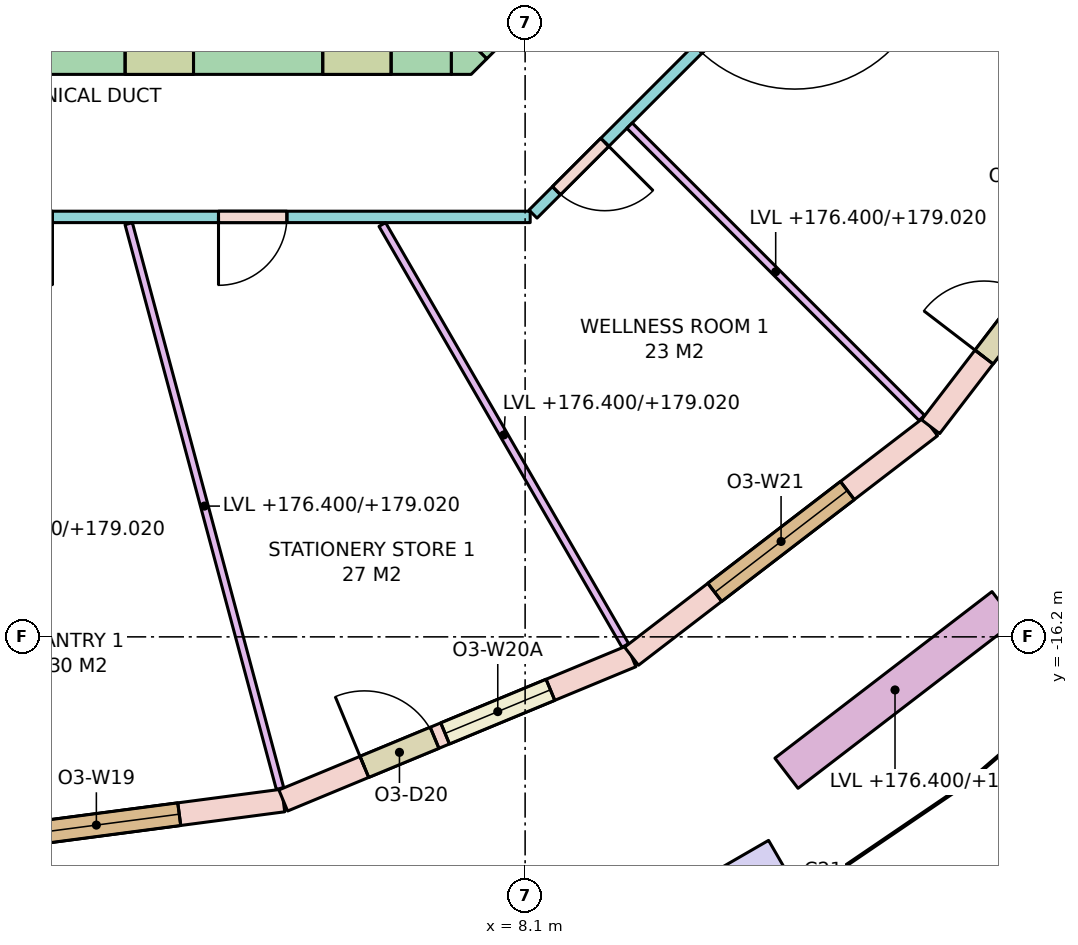
"""IFC4 building model, lengths in metres.
Left out: names, types, materials, properties, quantities, classifications, styles, units other than length and angle.
Written with IfcOpenShell. Run it as: python <this file> out.ifc"""

import sys

from ifc_helpers import new_model, si_unit, direction, frame, frame_2d, origin, origin_2d, place, context, subcontext, project, spatial, polyline, rectangle, outline, extrude, element, fill, save


model = new_model("IFC4")
c1 = context("Model", 3, precision=1e-05, world=origin(), true_north=direction((0.0, 1.0)))
c2 = subcontext(c1, "Body", "Model", "MODEL_VIEW")
j1 = project(units=[si_unit("LENGTHUNIT", "METRE"), si_unit("PLANEANGLEUNIT", "RADIAN")], contexts=[c1])
p1 = place(None, origin())
s1 = spatial("IfcSite", under=j1, at=p1, CompositionType="ELEMENT")
p2 = place(p1, origin())
s2 = spatial("IfcBuilding", under=s1, at=p2, CompositionType="ELEMENT")
p3 = place(p2, frame((0.0, 0.0, 176.4)))
s3 = spatial("IfcBuildingStorey", under=s2, at=p3, CompositionType="ELEMENT", Elevation=176.4)
p4 = place(p3, frame((11.25, -19.486, 0.0), z_axis=(0.0, 0.0, 1.0), x_axis=(0.866025403784, 0.5, 0.0)))
e1 = element("IfcColumn", 1, at=p4, inside=s3, PredefinedType="COLUMN", context=c2, shape_type="SweptSolid", body=[
    extrude(rectangle(XDim=0.7, YDim=1.0, at=origin_2d()), origin(), (0.0, 0.0, 1.0), 3.7),
])
p5 = place(p3, frame((-7.13, -8.45, -0.28), z_axis=(0.0, 0.0, 1.0), x_axis=(1.0, 0.0, 0.0)))
e2 = element("IfcWall", 2, at=p5, inside=s3, PredefinedType="SHEAR", context=c2, shape_type="SweptSolid", body=[
    extrude(rectangle(XDim=14.26, YDim=0.7, at=frame_2d((7.13, 0.0))), origin(), (0.0, 0.0, 1.0), 3.7),
])
p6 = place(p5, frame((8.08, 0.0, 0.28)))
e3 = element("IfcOpeningElement", 3, at=p6, cuts=e2, PredefinedType="OPENING", context=c2, shape_type="SweptSolid", body=[
    extrude(rectangle(XDim=0.7, YDim=2.1, at=frame_2d((0.35, 1.05))), frame((0.0, 0.36, 0.0), z_axis=(0.0, -1.0, 0.0), x_axis=(1.0, 0.0, 0.0)), (0.0, 0.0, 1.0), 0.72),
])
p7 = place(p5, frame((6.205, 0.0, 0.28)))
e4 = element("IfcOpeningElement", 4, at=p7, cuts=e2, PredefinedType="OPENING", context=c2, shape_type="SweptSolid", body=[
    extrude(rectangle(XDim=0.9, YDim=2.1, at=frame_2d((0.45, 1.05))), frame((0.0, 0.36, 0.0), z_axis=(0.0, -1.0, 0.0), x_axis=(1.0, 0.0, 0.0)), (0.0, 0.0, 1.0), 0.72),
])
p8 = place(p5, frame((9.967, 0.0, 0.28)))
e5 = element("IfcOpeningElement", 5, at=p8, cuts=e2, PredefinedType="OPENING", context=c2, shape_type="SweptSolid", body=[
    extrude(rectangle(XDim=0.9, YDim=2.1, at=frame_2d((0.45, 1.05))), frame((0.0, 0.36, 0.0), z_axis=(0.0, -1.0, 0.0), x_axis=(1.0, 0.0, 0.0)), (0.0, 0.0, 1.0), 0.72),
])
p9 = place(p5, frame((12.567, 0.0, 0.28)))
e6 = element("IfcOpeningElement", 6, at=p9, cuts=e2, PredefinedType="OPENING", context=c2, shape_type="SweptSolid", body=[
    extrude(rectangle(XDim=0.9, YDim=2.1, at=frame_2d((0.45, 1.05))), frame((0.0, 0.36, 0.0), z_axis=(0.0, -1.0, 0.0), x_axis=(1.0, 0.0, 0.0)), (0.0, 0.0, 1.0), 0.72),
])
p10 = place(p3, frame((10.347, -5.347, -0.28), z_axis=(0.0, 0.0, 1.0), x_axis=(-0.707106781187, -0.707106781187, 0.0)))
e7 = element("IfcWall", 7, at=p10, inside=s3, PredefinedType="SHEAR", context=c2, shape_type="SweptSolid", body=[
    extrude(rectangle(XDim=4.243, YDim=0.7, at=frame_2d((2.121, 0.0))), origin(), (0.0, 0.0, 1.0), 3.7),
])
p11 = place(p10, frame((0.52, 0.0, 0.28)))
e8 = element("IfcOpeningElement", 8, at=p11, cuts=e7, PredefinedType="OPENING", context=c2, shape_type="SweptSolid", body=[
    extrude(rectangle(XDim=0.9, YDim=2.1, at=frame_2d((0.45, 1.05))), frame((0.0, 0.36, 0.0), z_axis=(0.0, -1.0, 0.0), x_axis=(1.0, 0.0, 0.0)), (0.0, 0.0, 1.0), 0.72),
])
p12 = place(p3, frame((0.0, 0.0, -0.28)))
e9 = element("IfcWall", 9, at=p12, inside=s3, PredefinedType="SHEAR", context=c2, shape_type="SweptSolid", body=[
    extrude(outline(polyline([(7.39, -8.8), (7.13, -8.8), (7.13, -8.8), (7.13, -8.13), (7.595, -8.595), (7.595, -8.595), (7.595, -8.595), (7.39, -8.8)])), origin(), (0.0, 0.0, 1.0), 3.7),
])
p13 = place(p3, frame((0.0, -19.0, 0.0), z_axis=(0.0, 0.0, 1.0), x_axis=(0.991443234469, 0.130538549191, 0.0)))
e10 = element("IfcWall", 10, at=p13, inside=s3, PredefinedType="STANDARD", context=c2, shape_type="SweptSolid", body=[
    extrude(rectangle(XDim=4.96, YDim=0.3, at=frame_2d((2.48, 0.0))), origin(), (0.0, 0.0, 1.0), 3.42),
])
p14 = place(p13, frame((1.38, 0.0, 0.8)))
e11 = element("IfcOpeningElement", 11, at=p14, cuts=e10, PredefinedType="OPENING", context=c2, shape_type="SweptSolid", body=[
    extrude(rectangle(XDim=2.2, YDim=2.4, at=frame_2d((1.1, 1.2))), frame((0.0, 0.16, 0.0), z_axis=(0.0, -1.0, 0.0), x_axis=(1.0, 0.0, 0.0)), (0.0, 0.0, 1.0), 0.32),
])
p15 = place(p3, frame((4.917, -18.353, 0.0), z_axis=(0.0, 0.0, 1.0), x_axis=(0.923893254961, 0.382650301762, 0.0)))
e12 = element("IfcWall", 12, at=p15, inside=s3, PredefinedType="STANDARD", context=c2, shape_type="SweptSolid", body=[
    extrude(rectangle(XDim=4.96, YDim=0.3, at=frame_2d((2.48, 0.0))), origin(), (0.0, 0.0, 1.0), 3.42),
])
p16 = place(p15, frame((1.155, 0.0, 0.0)))
e13 = element("IfcOpeningElement", 13, at=p16, cuts=e12, PredefinedType="OPENING", context=c2, shape_type="SweptSolid", body=[
    extrude(rectangle(XDim=1.0, YDim=2.4, at=frame_2d((0.5, 1.2))), frame((0.0, 0.16, 0.0), z_axis=(0.0, -1.0, 0.0), x_axis=(1.0, 0.0, 0.0)), (0.0, 0.0, 1.0), 0.32),
])
p17 = place(p15, frame((2.305, 0.0, 0.8)))
e14 = element("IfcOpeningElement", 14, at=p17, cuts=e12, PredefinedType="OPENING", context=c2, shape_type="SweptSolid", body=[
    extrude(rectangle(XDim=1.5, YDim=2.4, at=frame_2d((0.75, 1.2))), frame((0.0, 0.16, 0.0), z_axis=(0.0, -1.0, 0.0), x_axis=(1.0, 0.0, 0.0)), (0.0, 0.0, 1.0), 0.32),
])
p18 = place(p3, frame((9.5, -16.455, 0.0), z_axis=(0.0, 0.0, 1.0), x_axis=(0.793348024649, 0.608768356425, 0.0)))
e15 = element("IfcWall", 15, at=p18, inside=s3, PredefinedType="STANDARD", context=c2, shape_type="SweptSolid", body=[
    extrude(rectangle(XDim=4.96, YDim=0.3, at=frame_2d((2.48, 0.0))), origin(), (0.0, 0.0, 1.0), 3.42),
])
p19 = place(p18, frame((1.38, 0.0, 0.8)))
e16 = element("IfcOpeningElement", 16, at=p19, cuts=e15, PredefinedType="OPENING", context=c2, shape_type="SweptSolid", body=[
    extrude(rectangle(XDim=2.2, YDim=2.4, at=frame_2d((1.1, 1.2))), frame((0.0, 0.16, 0.0), z_axis=(0.0, -1.0, 0.0), x_axis=(1.0, 0.0, 0.0)), (0.0, 0.0, 1.0), 0.32),
])
p20 = place(p3, frame((13.435, -13.435, 0.0), z_axis=(0.0, 0.0, 1.0), x_axis=(0.608768356425, 0.793348024649, 0.0)))
e17 = element("IfcWall", 17, at=p20, inside=s3, PredefinedType="STANDARD", context=c2, shape_type="SweptSolid", body=[
    extrude(rectangle(XDim=4.96, YDim=0.3, at=frame_2d((2.48, 0.0))), origin(), (0.0, 0.0, 1.0), 3.42),
])
p21 = place(p20, frame((1.155, 0.0, 0.0)))
e18 = element("IfcOpeningElement", 18, at=p21, cuts=e17, PredefinedType="OPENING", context=c2, shape_type="SweptSolid", body=[
    extrude(rectangle(XDim=1.0, YDim=2.4, at=frame_2d((0.5, 1.2))), frame((0.0, 0.16, 0.0), z_axis=(0.0, -1.0, 0.0), x_axis=(1.0, 0.0, 0.0)), (0.0, 0.0, 1.0), 0.32),
])
p22 = place(p20, frame((2.305, 0.0, 0.8)))
e19 = element("IfcOpeningElement", 19, at=p22, cuts=e17, PredefinedType="OPENING", context=c2, shape_type="SweptSolid", body=[
    extrude(rectangle(XDim=1.5, YDim=2.4, at=frame_2d((0.75, 1.2))), frame((0.0, 0.16, 0.0), z_axis=(0.0, -1.0, 0.0), x_axis=(1.0, 0.0, 0.0)), (0.0, 0.0, 1.0), 0.32),
])
p23 = place(p3, frame((11.539, -17.994, 0.0), z_axis=(0.0, 0.0, 1.0), x_axis=(0.793384730612, 0.608720518162, 0.0)))
e20 = element("IfcWall", 20, at=p23, inside=s3, PredefinedType="PARAPET", context=c2, shape_type="SweptSolid", body=[
    extrude(rectangle(XDim=3.6, YDim=0.5, at=frame_2d((1.8, 0.0))), origin(), (0.0, 0.0, 1.0), 0.9),
])
p24 = place(p3, frame((12.638, -6.204, 0.0), z_axis=(0.0, 0.0, 1.0), x_axis=(-0.707106781187, -0.707106781187, 0.0)))
e21 = element("IfcWall", 21, at=p24, inside=s3, PredefinedType="PARTITIONING", context=c2, shape_type="SweptSolid", body=[
    extrude(rectangle(XDim=6.271, YDim=0.15, at=frame_2d((3.135, 0.0))), origin(), (0.0, 0.0, 1.0), 2.62),
])
p25 = place(p24, frame((4.935, 0.0, 0.0)))
e22 = element("IfcOpeningElement", 22, at=p25, cuts=e21, PredefinedType="OPENING", context=c2, shape_type="SweptSolid", body=[
    extrude(rectangle(XDim=0.9, YDim=2.1, at=frame_2d((0.45, 1.05))), frame((0.0, 0.085, 0.0), z_axis=(0.0, -1.0, 0.0), x_axis=(1.0, 0.0, 0.0)), (0.0, 0.0, 1.0), 0.17),
])
p26 = place(p24, frame((1.4, 0.0, 0.0)))
e23 = element("IfcOpeningElement", 23, at=p26, cuts=e21, PredefinedType="OPENING", context=c2, shape_type="SweptSolid", body=[
    extrude(rectangle(XDim=1.8, YDim=2.1, at=frame_2d((0.9, 1.05))), frame((0.0, 0.085, 0.0), z_axis=(0.0, -1.0, 0.0), x_axis=(1.0, 0.0, 0.0)), (0.0, 0.0, 1.0), 0.17),
])
p27 = place(p3, frame((8.167, -10.675, 0.0), z_axis=(0.0, 0.0, 1.0), x_axis=(-1.0, 0.0, 0.0)))
e24 = element("IfcWall", 24, at=p27, inside=s3, PredefinedType="PARTITIONING", context=c2, shape_type="SweptSolid", body=[
    extrude(rectangle(XDim=16.333, YDim=0.15, at=frame_2d((8.167, 0.0))), origin(), (0.0, 0.0, 1.0), 2.62),
])
p28 = place(p27, frame((13.155, 0.0, 0.0)))
e25 = element("IfcOpeningElement", 25, at=p28, cuts=e24, PredefinedType="OPENING", context=c2, shape_type="SweptSolid", body=[
    extrude(rectangle(XDim=1.0, YDim=2.1, at=frame_2d((0.5, 1.05))), frame((0.0, 0.085, 0.0), z_axis=(0.0, -1.0, 0.0), x_axis=(1.0, 0.0, 0.0)), (0.0, 0.0, 1.0), 0.17),
])
p29 = place(p27, frame((9.148, 0.0, 0.0)))
e26 = element("IfcOpeningElement", 26, at=p29, cuts=e24, PredefinedType="OPENING", context=c2, shape_type="SweptSolid", body=[
    extrude(rectangle(XDim=0.9, YDim=2.1, at=frame_2d((0.45, 1.05))), frame((0.0, 0.085, 0.0), z_axis=(0.0, -1.0, 0.0), x_axis=(1.0, 0.0, 0.0)), (0.0, 0.0, 1.0), 0.17),
])
p30 = place(p27, frame((6.285, 0.0, 0.0)))
e27 = element("IfcOpeningElement", 27, at=p30, cuts=e24, PredefinedType="OPENING", context=c2, shape_type="SweptSolid", body=[
    extrude(rectangle(XDim=0.9, YDim=2.1, at=frame_2d((0.45, 1.05))), frame((0.0, 0.085, 0.0), z_axis=(0.0, -1.0, 0.0), x_axis=(1.0, 0.0, 0.0)), (0.0, 0.0, 1.0), 0.17),
])
p31 = place(p27, frame((3.201, 0.0, 0.0)))
e28 = element("IfcOpeningElement", 28, at=p31, cuts=e24, PredefinedType="OPENING", context=c2, shape_type="SweptSolid", body=[
    extrude(rectangle(XDim=0.9, YDim=2.1, at=frame_2d((0.45, 1.05))), frame((0.0, 0.085, 0.0), z_axis=(0.0, -1.0, 0.0), x_axis=(1.0, 0.0, 0.0)), (0.0, 0.0, 1.0), 0.17),
])
p32 = place(p3, frame((2.884, -10.764, 0.0), z_axis=(0.0, 0.0, 1.0), x_axis=(0.25881804804, -0.965926093451, 0.0)))
e29 = element("IfcWall", 29, at=p32, inside=s3, PredefinedType="PARTITIONING", context=c2, shape_type="SweptSolid", body=[
    extrude(rectangle(XDim=7.693, YDim=0.1, at=frame_2d((3.846, 0.0))), origin(), (0.0, 0.0, 1.0), 2.62),
])
p33 = place(p3, frame((6.221, -10.775, 0.0), z_axis=(0.0, 0.0, 1.0), x_axis=(0.500023166934, -0.866012027936, 0.0)))
e30 = element("IfcWall", 30, at=p33, inside=s3, PredefinedType="PARTITIONING", context=c2, shape_type="SweptSolid", body=[
    extrude(rectangle(XDim=6.395, YDim=0.1, at=frame_2d((3.198, 0.0))), origin(), (0.0, 0.0, 1.0), 2.62),
])
p34 = place(p3, frame((9.474, -9.474, 0.0), z_axis=(0.0, 0.0, 1.0), x_axis=(0.707106781187, -0.707106781187, 0.0)))
e31 = element("IfcWall", 31, at=p34, inside=s3, PredefinedType="PARTITIONING", context=c2, shape_type="SweptSolid", body=[
    extrude(rectangle(XDim=5.439, YDim=0.1, at=frame_2d((2.719, 0.0))), origin(), (0.0, 0.0, 1.0), 2.62),
])
p35 = place(p14, origin())
e32 = element("IfcWindow", 32, at=p35, inside=s3, PartitioningType="SINGLE_PANEL", PredefinedType="WINDOW", context=c2, shape_type="SweptSolid", body=[
    extrude(rectangle(XDim=2.2, YDim=2.4, at=frame_2d((1.1, 1.2))), frame((0.0, 0.03, 0.0), z_axis=(0.0, -1.0, 0.0), x_axis=(1.0, 0.0, 0.0)), (0.0, 0.0, 1.0), 0.06),
])
fill(e11, e32)
p36 = place(p16, origin())
e33 = element("IfcDoor", 33, at=p36, inside=s3, OperationType="SINGLE_SWING_LEFT", PredefinedType="DOOR", context=c2, shape_type="SweptSolid", body=[
    extrude(rectangle(XDim=1.0, YDim=2.4, at=frame_2d((0.5, 1.2))), frame((0.0, 0.025, 0.0), z_axis=(0.0, -1.0, 0.0), x_axis=(1.0, 0.0, 0.0)), (0.0, 0.0, 1.0), 0.05),
])
fill(e13, e33)
p37 = place(p17, origin())
e34 = element("IfcWindow", 34, at=p37, inside=s3, PartitioningType="SINGLE_PANEL", PredefinedType="WINDOW", context=c2, shape_type="SweptSolid", body=[
    extrude(rectangle(XDim=1.5, YDim=2.4, at=frame_2d((0.75, 1.2))), frame((0.0, 0.03, 0.0), z_axis=(0.0, -1.0, 0.0), x_axis=(1.0, 0.0, 0.0)), (0.0, 0.0, 1.0), 0.06),
])
fill(e14, e34)
p38 = place(p19, origin())
e35 = element("IfcWindow", 35, at=p38, inside=s3, PartitioningType="SINGLE_PANEL", PredefinedType="WINDOW", context=c2, shape_type="SweptSolid", body=[
    extrude(rectangle(XDim=2.2, YDim=2.4, at=frame_2d((1.1, 1.2))), frame((0.0, 0.03, 0.0), z_axis=(0.0, -1.0, 0.0), x_axis=(1.0, 0.0, 0.0)), (0.0, 0.0, 1.0), 0.06),
])
fill(e16, e35)
p39 = place(p21, origin())
e36 = element("IfcDoor", 36, at=p39, inside=s3, OperationType="SINGLE_SWING_LEFT", PredefinedType="DOOR", context=c2, shape_type="SweptSolid", body=[
    extrude(rectangle(XDim=1.0, YDim=2.4, at=frame_2d((0.5, 1.2))), frame((0.0, 0.025, 0.0), z_axis=(0.0, -1.0, 0.0), x_axis=(1.0, 0.0, 0.0)), (0.0, 0.0, 1.0), 0.05),
])
fill(e18, e36)
p40 = place(p30, origin())
e37 = element("IfcDoor", 37, at=p40, inside=s3, OperationType="SINGLE_SWING_LEFT", PredefinedType="DOOR", context=c2, shape_type="SweptSolid", body=[
    extrude(rectangle(XDim=0.9, YDim=2.1, at=frame_2d((0.45, 1.05))), frame((0.0, 0.025, 0.0), z_axis=(0.0, -1.0, 0.0), x_axis=(1.0, 0.0, 0.0)), (0.0, 0.0, 1.0), 0.05),
])
fill(e27, e37)
p41 = place(p31, origin())
e38 = element("IfcDoor", 38, at=p41, inside=s3, OperationType="SINGLE_SWING_RIGHT", PredefinedType="DOOR", context=c2, shape_type="SweptSolid", body=[
    extrude(rectangle(XDim=0.9, YDim=2.1, at=frame_2d((0.45, 1.05))), frame((0.0, 0.025, 0.0), z_axis=(0.0, -1.0, 0.0), x_axis=(1.0, 0.0, 0.0)), (0.0, 0.0, 1.0), 0.05),
])
fill(e28, e38)
p42 = place(p25, origin())
e39 = element("IfcDoor", 39, at=p42, inside=s3, OperationType="SINGLE_SWING_LEFT", PredefinedType="DOOR", context=c2, shape_type="SweptSolid", body=[
    extrude(rectangle(XDim=0.9, YDim=2.1, at=frame_2d((0.45, 1.05))), frame((0.0, 0.025, 0.0), z_axis=(0.0, -1.0, 0.0), x_axis=(1.0, 0.0, 0.0)), (0.0, 0.0, 1.0), 0.05),
])
fill(e22, e39)
save(model, sys.argv[1])
